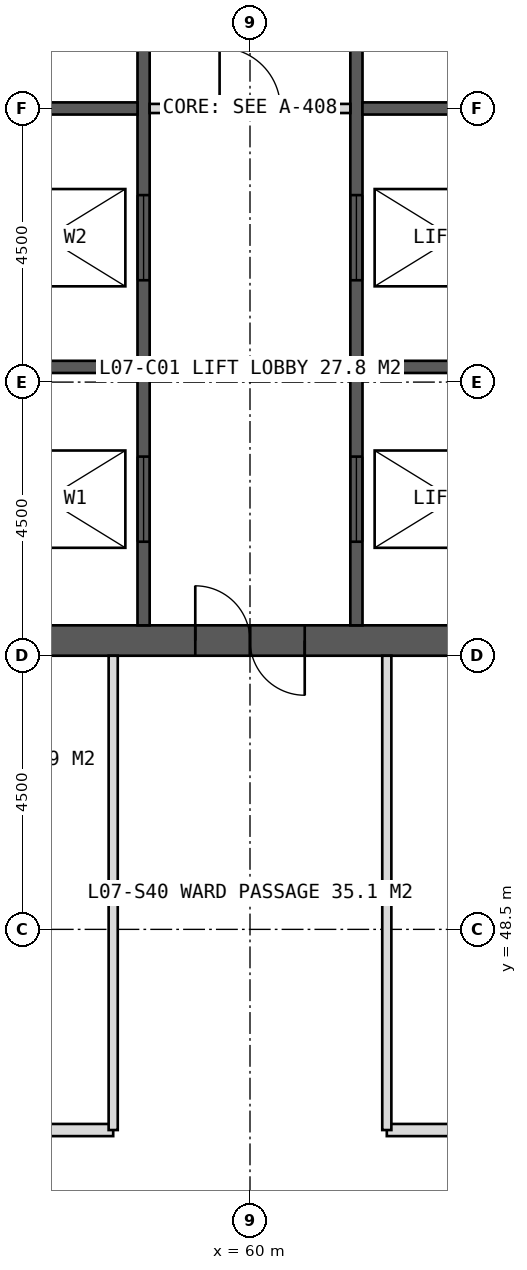
"""IFC4 building model, lengths in metres.
Left out: names, types, materials, properties, quantities, classifications, styles, units other than length and angle.
Written with IfcOpenShell. Run it as: python <this file> out.ifc"""

import sys

from ifc_helpers import new_model, si_unit, direction, frame, frame_2d, origin, place, context, subcontext, project, spatial, rectangle, extrude, element, fill, save


model = new_model("IFC4")
c1 = context("Model", 3, precision=1e-05, world=origin(), true_north=direction((0.0, 1.0)))
c2 = subcontext(c1, "Body", "Model", "MODEL_VIEW")
j1 = project(units=[si_unit("LENGTHUNIT", "METRE"), si_unit("PLANEANGLEUNIT", "RADIAN")], contexts=[c1])
p1 = place(None, origin())
s1 = spatial("IfcSite", under=j1, at=p1, CompositionType="ELEMENT")
p2 = place(p1, origin())
s2 = spatial("IfcBuilding", under=s1, at=p2, CompositionType="ELEMENT")
p3 = place(p2, frame((0.0, 0.0, 35.0)))
s3 = spatial("IfcBuildingStorey", under=s2, at=p3, CompositionType="ELEMENT", Elevation=35.0)
p4 = place(p3, frame((51.0, 53.25, 0.0), z_axis=(0.0, 0.0, 1.0), x_axis=(1.0, 0.0, 0.0)))
e1 = element("IfcWall", 1, at=p4, inside=s3, PredefinedType="SHEAR", context=c2, shape_type="SweptSolid", body=[
    extrude(rectangle(XDim=18.0, YDim=0.5, at=frame_2d((9.0, 0.0))), origin(), (0.0, 0.0, 1.0), 4.0),
])
p5 = place(p4, frame((8.1, 0.0, 0.0)))
e2 = element("IfcOpeningElement", 2, at=p5, cuts=e1, PredefinedType="OPENING", context=c2, shape_type="SweptSolid", body=[
    extrude(rectangle(XDim=1.8, YDim=2.2, at=frame_2d((0.9, 1.1))), frame((0.0, 0.26, 0.0), z_axis=(0.0, -1.0, 0.0), x_axis=(1.0, 0.0, 0.0)), (0.0, 0.0, 1.0), 0.52),
])
p6 = place(p3, frame((58.25, 53.5, 0.0), z_axis=(0.0, 0.0, 1.0), x_axis=(0.0, 1.0, 0.0)))
e3 = element("IfcWall", 3, at=p6, inside=s3, PredefinedType="SHEAR", context=c2, shape_type="SweptSolid", body=[
    extrude(rectangle(XDim=17.0, YDim=0.2, at=frame_2d((8.5, 0.0))), origin(), (0.0, 0.0, 1.0), 4.0),
])
p7 = place(p6, frame((1.375, 0.0, 0.0)))
e4 = element("IfcOpeningElement", 4, at=p7, cuts=e3, PredefinedType="OPENING", context=c2, shape_type="SweptSolid", body=[
    extrude(rectangle(XDim=1.4, YDim=2.2, at=frame_2d((0.7, 1.1))), frame((0.0, 0.11, 0.0), z_axis=(0.0, -1.0, 0.0), x_axis=(1.0, 0.0, 0.0)), (0.0, 0.0, 1.0), 0.22),
])
p8 = place(p6, frame((5.675, 0.0, 0.0)))
e5 = element("IfcOpeningElement", 5, at=p8, cuts=e3, PredefinedType="OPENING", context=c2, shape_type="SweptSolid", body=[
    extrude(rectangle(XDim=1.4, YDim=2.2, at=frame_2d((0.7, 1.1))), frame((0.0, 0.11, 0.0), z_axis=(0.0, -1.0, 0.0), x_axis=(1.0, 0.0, 0.0)), (0.0, 0.0, 1.0), 0.22),
])
p9 = place(p3, frame((61.75, 53.5, 0.0), z_axis=(0.0, 0.0, 1.0), x_axis=(0.0, 1.0, 0.0)))
e6 = element("IfcWall", 6, at=p9, inside=s3, PredefinedType="SHEAR", context=c2, shape_type="SweptSolid", body=[
    extrude(rectangle(XDim=17.0, YDim=0.2, at=frame_2d((8.5, 0.0))), origin(), (0.0, 0.0, 1.0), 4.0),
])
p10 = place(p9, frame((1.375, 0.0, 0.0)))
e7 = element("IfcOpeningElement", 7, at=p10, cuts=e6, PredefinedType="OPENING", context=c2, shape_type="SweptSolid", body=[
    extrude(rectangle(XDim=1.4, YDim=2.2, at=frame_2d((0.7, 1.1))), frame((0.0, 0.11, 0.0), z_axis=(0.0, -1.0, 0.0), x_axis=(1.0, 0.0, 0.0)), (0.0, 0.0, 1.0), 0.22),
])
p11 = place(p9, frame((5.675, 0.0, 0.0)))
e8 = element("IfcOpeningElement", 8, at=p11, cuts=e6, PredefinedType="OPENING", context=c2, shape_type="SweptSolid", body=[
    extrude(rectangle(XDim=1.4, YDim=2.2, at=frame_2d((0.7, 1.1))), frame((0.0, 0.11, 0.0), z_axis=(0.0, -1.0, 0.0), x_axis=(1.0, 0.0, 0.0)), (0.0, 0.0, 1.0), 0.22),
])
for number, where, z_axis, x_axis in (
    (9, (55.1, 57.75, 0.0), (0.0, 0.0, 1.0), (1.0, 0.0, 0.0)),
    (10, (61.85, 57.75, 0.0), (0.0, 0.0, 1.0), (1.0, 0.0, 0.0)),
    (11, (55.1, 62.0, 0.0), (0.0, 0.0, 1.0), (1.0, 0.0, 0.0)),
    (12, (61.85, 62.0, 0.0), (0.0, 0.0, 1.0), (1.0, 0.0, 0.0)),
):
    element("IfcWall", number, at=place(p3, frame(where, z_axis=z_axis, x_axis=x_axis)), inside=s3, PredefinedType="SHEAR", context=c2, shape_type="SweptSolid", body=[
        extrude(rectangle(XDim=3.05, YDim=0.2, at=frame_2d((1.525, 0.0))), origin(), (0.0, 0.0, 1.0), 4.0),
    ])
p12 = place(p3, frame((76.8, 45.2, 0.0), z_axis=(0.0, 0.0, 1.0), x_axis=(-1.0, 0.0, 0.0)))
e13 = element("IfcWall", 13, at=p12, inside=s3, PredefinedType="PARTITIONING", context=c2, shape_type="SweptSolid", body=[
    extrude(rectangle(XDim=14.55, YDim=0.2, at=frame_2d((7.275, 0.0))), origin(), (0.0, 0.0, 1.0), 3.75),
])
p13 = place(p12, frame((10.675, 0.0, 0.0)))
e14 = element("IfcOpeningElement", 14, at=p13, cuts=e13, PredefinedType="OPENING", context=c2, shape_type="SweptSolid", body=[
    extrude(rectangle(XDim=1.0, YDim=2.1, at=frame_2d((0.5, 1.05))), frame((0.0, 0.11, 0.0), z_axis=(0.0, -1.0, 0.0), x_axis=(1.0, 0.0, 0.0)), (0.0, 0.0, 1.0), 0.22),
])
p14 = place(p3, frame((57.75, 45.2, 0.0), z_axis=(0.0, 0.0, 1.0), x_axis=(-1.0, 0.0, 0.0)))
e15 = element("IfcWall", 15, at=p14, inside=s3, PredefinedType="PARTITIONING", context=c2, shape_type="SweptSolid", body=[
    extrude(rectangle(XDim=14.55, YDim=0.2, at=frame_2d((7.275, 0.0))), origin(), (0.0, 0.0, 1.0), 3.75),
])
p15 = place(p14, frame((2.125, 0.0, 0.0)))
e16 = element("IfcOpeningElement", 16, at=p15, cuts=e15, PredefinedType="OPENING", context=c2, shape_type="SweptSolid", body=[
    extrude(rectangle(XDim=1.0, YDim=2.1, at=frame_2d((0.5, 1.05))), frame((0.0, 0.11, 0.0), z_axis=(0.0, -1.0, 0.0), x_axis=(1.0, 0.0, 0.0)), (0.0, 0.0, 1.0), 0.22),
])
p16 = place(p14, frame((7.0, 0.0, 0.0)))
e17 = element("IfcOpeningElement", 17, at=p16, cuts=e15, PredefinedType="OPENING", context=c2, shape_type="SweptSolid", body=[
    extrude(rectangle(XDim=1.0, YDim=2.1, at=frame_2d((0.5, 1.05))), frame((0.0, 0.11, 0.0), z_axis=(0.0, -1.0, 0.0), x_axis=(1.0, 0.0, 0.0)), (0.0, 0.0, 1.0), 0.22),
])
p17 = place(p14, frame((11.65, 0.0, 0.0)))
e18 = element("IfcOpeningElement", 18, at=p17, cuts=e15, PredefinedType="OPENING", context=c2, shape_type="SweptSolid", body=[
    extrude(rectangle(XDim=1.0, YDim=2.1, at=frame_2d((0.5, 1.05))), frame((0.0, 0.11, 0.0), z_axis=(0.0, -1.0, 0.0), x_axis=(1.0, 0.0, 0.0)), (0.0, 0.0, 1.0), 0.22),
])
for number, where, z_axis, x_axis in (
    (19, (62.25, 53.0, 0.0), (0.0, 0.0, 1.0), (0.0, -1.0, 0.0)),
    (20, (57.75, 53.0, 0.0), (0.0, 0.0, 1.0), (0.0, -1.0, 0.0)),
):
    element("IfcWall", number, at=place(p3, frame(where, z_axis=z_axis, x_axis=x_axis)), inside=s3, PredefinedType="PARTITIONING", context=c2, shape_type="SweptSolid", body=[
        extrude(rectangle(XDim=7.8, YDim=0.15, at=frame_2d((3.9, 0.0))), origin(), (0.0, 0.0, 1.0), 3.75),
    ])
p18 = place(p3, frame((58.35, 62.0, 0.0), z_axis=(0.0, 0.0, 1.0), x_axis=(1.0, 0.0, 0.0)))
e21 = element("IfcWall", 21, at=p18, inside=s3, PredefinedType="PARTITIONING", context=c2, shape_type="SweptSolid", body=[
    extrude(rectangle(XDim=3.3, YDim=0.15, at=frame_2d((1.65, 0.0))), origin(), (0.0, 0.0, 1.0), 3.75),
])
p19 = place(p18, frame((1.15, 0.0, 0.0)))
e22 = element("IfcOpeningElement", 22, at=p19, cuts=e21, PredefinedType="OPENING", context=c2, shape_type="SweptSolid", body=[
    extrude(rectangle(XDim=1.0, YDim=2.1, at=frame_2d((0.5, 1.05))), frame((0.0, 0.085, 0.0), z_axis=(0.0, -1.0, 0.0), x_axis=(1.0, 0.0, 0.0)), (0.0, 0.0, 1.0), 0.17),
])
p20 = place(p5, origin())
e23 = element("IfcDoor", 23, at=p20, inside=s3, OperationType="DOUBLE_DOOR_SINGLE_SWING", PredefinedType="DOOR", context=c2, shape_type="SweptSolid", body=[
    extrude(rectangle(XDim=1.8, YDim=2.2, at=frame_2d((0.9, 1.1))), frame((0.0, 0.025, 0.0), z_axis=(0.0, -1.0, 0.0), x_axis=(1.0, 0.0, 0.0)), (0.0, 0.0, 1.0), 0.05),
])
fill(e2, e23)
p21 = place(p7, origin())
e24 = element("IfcDoor", 24, at=p21, inside=s3, OperationType="SLIDING_TO_LEFT", PredefinedType="DOOR", context=c2, shape_type="SweptSolid", body=[
    extrude(rectangle(XDim=1.4, YDim=2.2, at=frame_2d((0.7, 1.1))), frame((0.0, 0.025, 0.0), z_axis=(0.0, -1.0, 0.0), x_axis=(1.0, 0.0, 0.0)), (0.0, 0.0, 1.0), 0.05),
])
fill(e4, e24)
p22 = place(p10, origin())
e25 = element("IfcDoor", 25, at=p22, inside=s3, OperationType="SLIDING_TO_LEFT", PredefinedType="DOOR", context=c2, shape_type="SweptSolid", body=[
    extrude(rectangle(XDim=1.4, YDim=2.2, at=frame_2d((0.7, 1.1))), frame((0.0, 0.025, 0.0), z_axis=(0.0, -1.0, 0.0), x_axis=(1.0, 0.0, 0.0)), (0.0, 0.0, 1.0), 0.05),
])
fill(e7, e25)
p23 = place(p8, origin())
e26 = element("IfcDoor", 26, at=p23, inside=s3, OperationType="SLIDING_TO_LEFT", PredefinedType="DOOR", context=c2, shape_type="SweptSolid", body=[
    extrude(rectangle(XDim=1.4, YDim=2.2, at=frame_2d((0.7, 1.1))), frame((0.0, 0.025, 0.0), z_axis=(0.0, -1.0, 0.0), x_axis=(1.0, 0.0, 0.0)), (0.0, 0.0, 1.0), 0.05),
])
fill(e5, e26)
p24 = place(p11, origin())
e27 = element("IfcDoor", 27, at=p24, inside=s3, OperationType="SLIDING_TO_LEFT", PredefinedType="DOOR", context=c2, shape_type="SweptSolid", body=[
    extrude(rectangle(XDim=1.4, YDim=2.2, at=frame_2d((0.7, 1.1))), frame((0.0, 0.025, 0.0), z_axis=(0.0, -1.0, 0.0), x_axis=(1.0, 0.0, 0.0)), (0.0, 0.0, 1.0), 0.05),
])
fill(e8, e27)
p25 = place(p19, origin())
e28 = element("IfcDoor", 28, at=p25, inside=s3, OperationType="SINGLE_SWING_LEFT", PredefinedType="DOOR", context=c2, shape_type="SweptSolid", body=[
    extrude(rectangle(XDim=1.0, YDim=2.1, at=frame_2d((0.5, 1.05))), frame((0.0, 0.025, 0.0), z_axis=(0.0, -1.0, 0.0), x_axis=(1.0, 0.0, 0.0)), (0.0, 0.0, 1.0), 0.05),
])
fill(e22, e28)
save(model, sys.argv[1])
